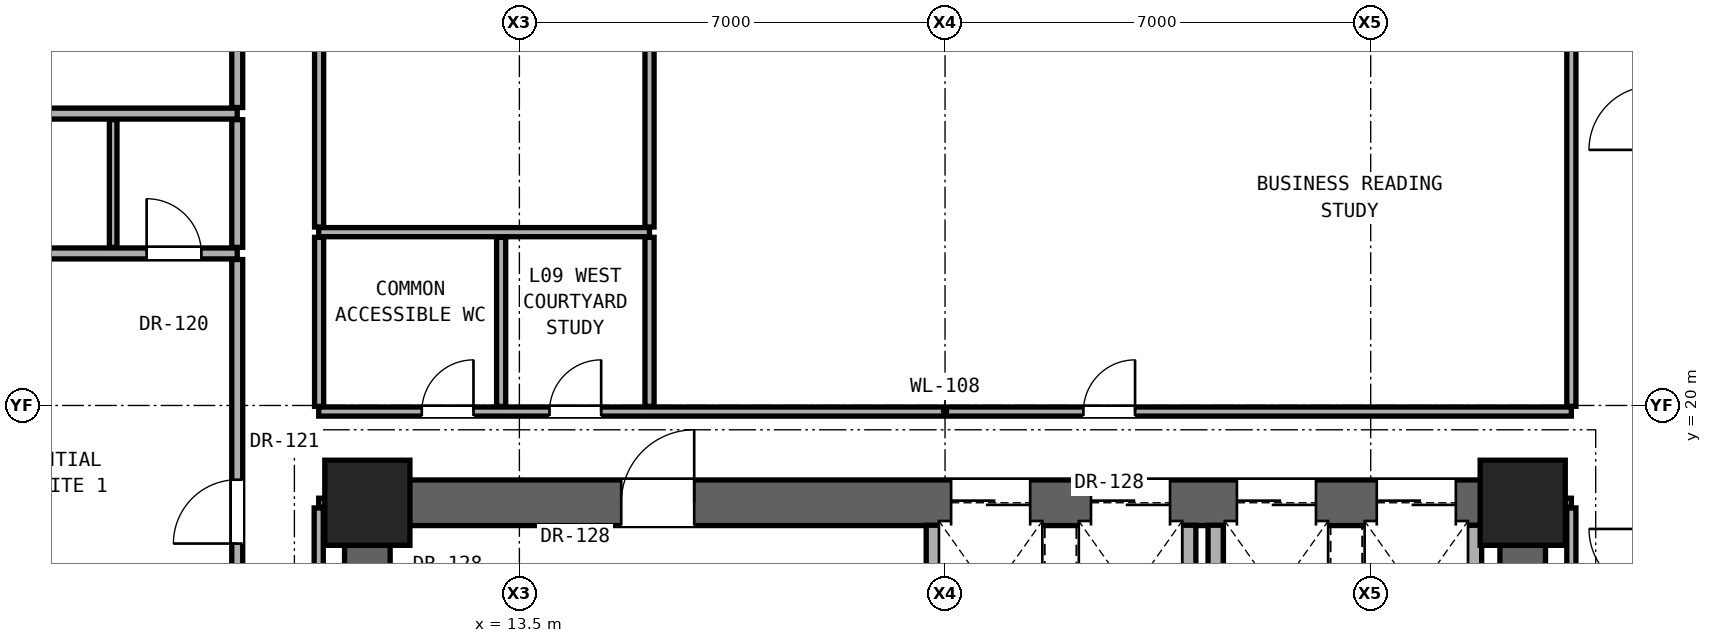
"""IFC4 building model, lengths in metres.
Left out: names, types, materials, properties, quantities, classifications, styles, units other than length and angle.
Written with IfcOpenShell. Run it as: python <this file> out.ifc"""

import sys

from ifc_helpers import new_model, si_unit, direction, frame, frame_2d, origin, origin_2d, place, context, subcontext, project, spatial, rectangle, extrude, element, fill, save


model = new_model("IFC4")
c1 = context("Model", 3, precision=1e-05, world=origin(), true_north=direction((0.0, 1.0)))
c2 = subcontext(c1, "Body", "Model", "MODEL_VIEW")
j1 = project(units=[si_unit("LENGTHUNIT", "METRE"), si_unit("PLANEANGLEUNIT", "RADIAN")], contexts=[c1])
p1 = place(None, origin())
s1 = spatial("IfcSite", under=j1, at=p1, CompositionType="ELEMENT")
p2 = place(p1, origin())
s2 = spatial("IfcBuilding", under=s1, at=p2, CompositionType="ELEMENT")
p3 = place(p2, frame((0.0, 0.0, 35.6)))
s3 = spatial("IfcBuildingStorey", under=s2, at=p3, CompositionType="ELEMENT", Elevation=35.6)
for number, where, z_axis, x_axis in (
    (1, (11.0, 18.4, 0.0), (0.0, 0.0, 1.0), (1.0, 0.0, 0.0)),
    (2, (30.0, 18.4, 0.0), (0.0, 0.0, 1.0), (1.0, 0.0, 0.0)),
):
    element("IfcColumn", number, at=place(p3, frame(where, z_axis=z_axis, x_axis=x_axis)), inside=s3, PredefinedType="COLUMN", context=c2, shape_type="SweptSolid", body=[
        extrude(rectangle(XDim=1.4, YDim=1.4, at=origin_2d()), origin(), (0.0, 0.0, 1.0), 3.3),
    ])
for number, where, z_axis, x_axis in (
    (3, (11.0, 12.4, 0.0), (0.0, 0.0, 1.0), (0.0, 1.0, 0.0)),
    (4, (30.0, 12.4, 0.0), (0.0, 0.0, 1.0), (0.0, 1.0, 0.0)),
):
    element("IfcWall", number, at=place(p3, frame(where, z_axis=z_axis, x_axis=x_axis)), inside=s3, PredefinedType="SHEAR", context=c2, shape_type="SweptSolid", body=[
        extrude(rectangle(XDim=6.0, YDim=0.75, at=frame_2d((3.0, 0.0))), origin(), (0.0, 0.0, 1.0), 3.06),
    ])
p4 = place(p3, frame((11.0, 18.4, 0.0), z_axis=(0.0, 0.0, 1.0), x_axis=(1.0, 0.0, 0.0)))
e5 = element("IfcWall", 5, at=p4, inside=s3, PredefinedType="SHEAR", context=c2, shape_type="SweptSolid", body=[
    extrude(rectangle(XDim=19.0, YDim=0.75, at=frame_2d((9.5, 0.0))), origin(), (0.0, 0.0, 1.0), 3.06),
])
p5 = place(p4, frame((4.175, 0.0, 0.0)))
e6 = element("IfcOpeningElement", 6, at=p5, cuts=e5, PredefinedType="OPENING", context=c2, shape_type="SweptSolid", body=[
    extrude(rectangle(XDim=1.2, YDim=2.25, at=frame_2d((0.6, 1.125))), frame((0.0, 0.385, 0.0), z_axis=(0.0, -1.0, 0.0), x_axis=(1.0, 0.0, 0.0)), (0.0, 0.0, 1.0), 0.77),
])
p6 = place(p4, frame((9.6, 0.0, 0.0)))
e7 = element("IfcOpeningElement", 7, at=p6, cuts=e5, PredefinedType="OPENING", context=c2, shape_type="SweptSolid", body=[
    extrude(rectangle(XDim=1.3, YDim=2.3, at=frame_2d((0.65, 1.15))), frame((0.0, 0.385, 0.0), z_axis=(0.0, -1.0, 0.0), x_axis=(1.0, 0.0, 0.0)), (0.0, 0.0, 1.0), 0.77),
])
p7 = place(p4, frame((11.9, 0.0, 0.0)))
e8 = element("IfcOpeningElement", 8, at=p7, cuts=e5, PredefinedType="OPENING", context=c2, shape_type="SweptSolid", body=[
    extrude(rectangle(XDim=1.3, YDim=2.3, at=frame_2d((0.65, 1.15))), frame((0.0, 0.385, 0.0), z_axis=(0.0, -1.0, 0.0), x_axis=(1.0, 0.0, 0.0)), (0.0, 0.0, 1.0), 0.77),
])
p8 = place(p4, frame((14.3, 0.0, 0.0)))
e9 = element("IfcOpeningElement", 9, at=p8, cuts=e5, PredefinedType="OPENING", context=c2, shape_type="SweptSolid", body=[
    extrude(rectangle(XDim=1.3, YDim=2.3, at=frame_2d((0.65, 1.15))), frame((0.0, 0.385, 0.0), z_axis=(0.0, -1.0, 0.0), x_axis=(1.0, 0.0, 0.0)), (0.0, 0.0, 1.0), 0.77),
])
p9 = place(p4, frame((16.6, 0.0, 0.0)))
e10 = element("IfcOpeningElement", 10, at=p9, cuts=e5, PredefinedType="OPENING", context=c2, shape_type="SweptSolid", body=[
    extrude(rectangle(XDim=1.3, YDim=2.3, at=frame_2d((0.65, 1.15))), frame((0.0, 0.385, 0.0), z_axis=(0.0, -1.0, 0.0), x_axis=(1.0, 0.0, 0.0)), (0.0, 0.0, 1.0), 0.77),
])
for number, where, z_axis, x_axis in (
    (11, (10.2, 18.4, 0.0), (0.0, 0.0, 1.0), (1.0, 0.0, 0.0)),
    (12, (30.37, 18.4, 0.0), (0.0, 0.0, 1.0), (1.0, 0.0, 0.0)),
):
    element("IfcWall", number, at=place(p3, frame(where, z_axis=z_axis, x_axis=x_axis)), inside=s3, PredefinedType="PARTITIONING", context=c2, shape_type="SweptSolid", body=[
        extrude(rectangle(XDim=0.43, YDim=0.15, at=frame_2d((0.215, 0.0))), origin(), (0.0, 0.0, 1.0), 2.436),
    ])
p10 = place(p3, frame((10.2, 19.9, 0.0), z_axis=(0.0, 0.0, 1.0), x_axis=(1.0, 0.0, 0.0)))
e13 = element("IfcWall", 13, at=p10, inside=s3, PredefinedType="PARTITIONING", context=c2, shape_type="SweptSolid", body=[
    extrude(rectangle(XDim=20.6, YDim=0.15, at=frame_2d((10.3, 0.0))), origin(), (0.0, 0.0, 1.0), 2.104),
])
p11 = place(p10, frame((1.695, 0.0, 0.0)))
e14 = element("IfcOpeningElement", 14, at=p11, cuts=e13, PredefinedType="OPENING", context=c2, shape_type="SweptSolid", body=[
    extrude(rectangle(XDim=0.85, YDim=2.01, at=frame_2d((0.425, 1.005))), frame((0.0, 0.085, 0.0), z_axis=(0.0, -1.0, 0.0), x_axis=(1.0, 0.0, 0.0)), (0.0, 0.0, 1.0), 0.17),
])
p12 = place(p10, frame((3.795, 0.0, 0.0)))
e15 = element("IfcOpeningElement", 15, at=p12, cuts=e13, PredefinedType="OPENING", context=c2, shape_type="SweptSolid", body=[
    extrude(rectangle(XDim=0.85, YDim=2.01, at=frame_2d((0.425, 1.005))), frame((0.0, 0.085, 0.0), z_axis=(0.0, -1.0, 0.0), x_axis=(1.0, 0.0, 0.0)), (0.0, 0.0, 1.0), 0.17),
])
p13 = place(p10, frame((12.575, 0.0, 0.0)))
e16 = element("IfcOpeningElement", 16, at=p13, cuts=e13, PredefinedType="OPENING", context=c2, shape_type="SweptSolid", body=[
    extrude(rectangle(XDim=0.85, YDim=2.01, at=frame_2d((0.425, 1.005))), frame((0.0, 0.085, 0.0), z_axis=(0.0, -1.0, 0.0), x_axis=(1.0, 0.0, 0.0)), (0.0, 0.0, 1.0), 0.17),
])
p14 = place(p3, frame((-1.6, 22.5, 0.0), z_axis=(0.0, 0.0, 1.0), x_axis=(1.0, 0.0, 0.0)))
e17 = element("IfcWall", 17, at=p14, inside=s3, PredefinedType="PARTITIONING", context=c2, shape_type="SweptSolid", body=[
    extrude(rectangle(XDim=10.46, YDim=0.18, at=frame_2d((5.23, 0.0))), origin(), (0.0, 0.0, 1.0), 2.125),
])
p15 = place(p14, frame((3.805, 0.0, 0.0)))
e18 = element("IfcOpeningElement", 18, at=p15, cuts=e17, PredefinedType="OPENING", context=c2, shape_type="SweptSolid", body=[
    extrude(rectangle(XDim=0.85, YDim=2.01, at=frame_2d((0.425, 1.005))), frame((0.0, 0.1, 0.0), z_axis=(0.0, -1.0, 0.0), x_axis=(1.0, 0.0, 0.0)), (0.0, 0.0, 1.0), 0.2),
])
p16 = place(p14, frame((8.97, 0.0, 0.0)))
e19 = element("IfcOpeningElement", 19, at=p16, cuts=e17, PredefinedType="OPENING", context=c2, shape_type="SweptSolid", body=[
    extrude(rectangle(XDim=0.9, YDim=2.1, at=frame_2d((0.45, 1.05))), frame((0.0, 0.1, 0.0), z_axis=(0.0, -1.0, 0.0), x_axis=(1.0, 0.0, 0.0)), (0.0, 0.0, 1.0), 0.2),
])
p17 = place(p3, frame((10.2, 22.85, 0.0), z_axis=(0.0, 0.0, 1.0), x_axis=(1.0, 0.0, 0.0)))
e20 = element("IfcWall", 20, at=p17, inside=s3, PredefinedType="PARTITIONING", context=c2, shape_type="SweptSolid", body=[
    extrude(rectangle(XDim=5.44, YDim=0.15, at=frame_2d((2.72, 0.0))), origin(), (0.0, 0.0, 1.0), 2.104),
])
p18 = place(p3, frame((-1.6, 24.8, 0.0), z_axis=(0.0, 0.0, 1.0), x_axis=(1.0, 0.0, 0.0)))
e21 = element("IfcWall", 21, at=p18, inside=s3, PredefinedType="PARTITIONING", context=c2, shape_type="SweptSolid", body=[
    extrude(rectangle(XDim=10.46, YDim=0.18, at=frame_2d((5.23, 0.0))), origin(), (0.0, 0.0, 1.0), 2.125),
])
p19 = place(p3, frame((6.82, 22.6, 0.0), z_axis=(0.0, 0.0, 1.0), x_axis=(0.0, 1.0, 0.0)))
e22 = element("IfcWall", 22, at=p19, inside=s3, PredefinedType="PARTITIONING", context=c2, shape_type="SweptSolid", body=[
    extrude(rectangle(XDim=2.1, YDim=0.125, at=frame_2d((1.05, 0.0))), origin(), (0.0, 0.0, 1.0), 2.279),
])
p20 = place(p3, frame((8.86, 14.108, 0.0), z_axis=(0.0, 0.0, 1.0), x_axis=(0.0, 1.0, 0.0)))
e23 = element("IfcWall", 23, at=p20, inside=s3, PredefinedType="PARTITIONING", context=c2, shape_type="SweptSolid", body=[
    extrude(rectangle(XDim=8.292, YDim=0.18, at=frame_2d((4.146, 0.0))), origin(), (0.0, 0.0, 1.0), 2.436),
])
p21 = place(p20, frame((3.621, 0.0, 0.0)))
e24 = element("IfcOpeningElement", 24, at=p21, cuts=e23, PredefinedType="OPENING", context=c2, shape_type="SweptSolid", body=[
    extrude(rectangle(XDim=1.05, YDim=2.2, at=frame_2d((0.525, 1.1))), frame((0.0, 0.1, 0.0), z_axis=(0.0, -1.0, 0.0), x_axis=(1.0, 0.0, 0.0)), (0.0, 0.0, 1.0), 0.2),
])
p22 = place(p3, frame((8.86, 22.6, 0.0), z_axis=(0.0, 0.0, 1.0), x_axis=(0.0, 1.0, 0.0)))
e25 = element("IfcWall", 25, at=p22, inside=s3, PredefinedType="PARTITIONING", context=c2, shape_type="SweptSolid", body=[
    extrude(rectangle(XDim=2.1, YDim=0.18, at=frame_2d((1.05, 0.0))), origin(), (0.0, 0.0, 1.0), 2.279),
])
p23 = place(p3, frame((8.86, 24.9, 0.0), z_axis=(0.0, 0.0, 1.0), x_axis=(0.0, 1.0, 0.0)))
e26 = element("IfcWall", 26, at=p23, inside=s3, PredefinedType="PARTITIONING", context=c2, shape_type="SweptSolid", body=[
    extrude(rectangle(XDim=3.9, YDim=0.18, at=frame_2d((1.95, 0.0))), origin(), (0.0, 0.0, 1.0), 2.279),
])
p24 = place(p23, frame((1.425, 0.0, 0.0)))
e27 = element("IfcOpeningElement", 27, at=p24, cuts=e26, PredefinedType="OPENING", context=c2, shape_type="SweptSolid", body=[
    extrude(rectangle(XDim=1.05, YDim=2.2, at=frame_2d((0.525, 1.1))), frame((0.0, 0.1, 0.0), z_axis=(0.0, -1.0, 0.0), x_axis=(1.0, 0.0, 0.0)), (0.0, 0.0, 1.0), 0.2),
])
p25 = place(p3, frame((10.2, 12.335, 0.0), z_axis=(0.0, 0.0, 1.0), x_axis=(0.0, 1.0, 0.0)))
e28 = element("IfcWall", 28, at=p25, inside=s3, PredefinedType="PARTITIONING", context=c2, shape_type="SweptSolid", body=[
    extrude(rectangle(XDim=5.98, YDim=0.15, at=frame_2d((2.99, 0.0))), origin(), (0.0, 0.0, 1.0), 2.436),
])
p26 = place(p3, frame((10.207, 19.985, 0.0), z_axis=(0.0, 0.0, 1.0), x_axis=(0.0, 1.0, 0.0)))
e29 = element("IfcWall", 29, at=p26, inside=s3, PredefinedType="PARTITIONING", context=c2, shape_type="SweptSolid", body=[
    extrude(rectangle(XDim=2.78, YDim=0.15, at=frame_2d((1.39, 0.0))), origin(), (0.0, 0.0, 1.0), 3.06),
])
p27 = place(p3, frame((10.207, 22.935, 0.0), z_axis=(0.0, 0.0, 1.0), x_axis=(0.0, 1.0, 0.0)))
e30 = element("IfcWall", 30, at=p27, inside=s3, PredefinedType="PARTITIONING", context=c2, shape_type="SweptSolid", body=[
    extrude(rectangle(XDim=10.08, YDim=0.15, at=frame_2d((5.04, 0.0))), origin(), (0.0, 0.0, 1.0), 2.279),
])
p28 = place(p27, frame((4.565, 0.0, 0.0)))
e31 = element("IfcOpeningElement", 31, at=p28, cuts=e30, PredefinedType="OPENING", context=c2, shape_type="SweptSolid", body=[
    extrude(rectangle(XDim=0.95, YDim=2.15, at=frame_2d((0.475, 1.075))), frame((0.0, 0.085, 0.0), z_axis=(0.0, -1.0, 0.0), x_axis=(1.0, 0.0, 0.0)), (0.0, 0.0, 1.0), 0.17),
])
p29 = place(p3, frame((13.2, 19.985, 0.0), z_axis=(0.0, 0.0, 1.0), x_axis=(0.0, 1.0, 0.0)))
e32 = element("IfcWall", 32, at=p29, inside=s3, PredefinedType="PARTITIONING", context=c2, shape_type="SweptSolid", body=[
    extrude(rectangle(XDim=2.78, YDim=0.15, at=frame_2d((1.39, 0.0))), origin(), (0.0, 0.0, 1.0), 3.06),
])
p30 = place(p3, frame((15.64, 19.985, 0.0), z_axis=(0.0, 0.0, 1.0), x_axis=(0.0, 1.0, 0.0)))
e33 = element("IfcWall", 33, at=p30, inside=s3, PredefinedType="PARTITIONING", context=c2, shape_type="SweptSolid", body=[
    extrude(rectangle(XDim=2.78, YDim=0.15, at=frame_2d((1.39, 0.0))), origin(), (0.0, 0.0, 1.0), 2.589),
])
p31 = place(p3, frame((15.64, 22.935, 0.0), z_axis=(0.0, 0.0, 1.0), x_axis=(0.0, 1.0, 0.0)))
e34 = element("IfcWall", 34, at=p31, inside=s3, PredefinedType="PARTITIONING", context=c2, shape_type="SweptSolid", body=[
    extrude(rectangle(XDim=4.008, YDim=0.15, at=frame_2d((2.004, 0.0))), origin(), (0.0, 0.0, 1.0), 2.104),
])
p32 = place(p3, frame((20.315, 16.555, 0.0), z_axis=(0.0, 0.0, 1.0), x_axis=(0.0, 1.0, 0.0)))
e35 = element("IfcWall", 35, at=p32, inside=s3, PredefinedType="SOLIDWALL", context=c2, shape_type="SweptSolid", body=[
    extrude(rectangle(XDim=1.475, YDim=0.25, at=frame_2d((0.738, 0.0))), origin(), (0.0, 0.0, 1.0), 3.06),
])
for number, where, z_axis, x_axis in (
    (36, (24.5, 15.785, 0.0), (0.0, 0.0, 1.0), (0.0, 1.0, 0.0)),
    (37, (24.95, 15.785, 0.0), (0.0, 0.0, 1.0), (0.0, 1.0, 0.0)),
    (38, (29.2, 15.785, 0.0), (0.0, 0.0, 1.0), (0.0, 1.0, 0.0)),
):
    element("IfcWall", number, at=place(p3, frame(where, z_axis=z_axis, x_axis=x_axis)), inside=s3, PredefinedType="SOLIDWALL", context=c2, shape_type="SweptSolid", body=[
        extrude(rectangle(XDim=2.245, YDim=0.25, at=frame_2d((1.123, 0.0))), origin(), (0.0, 0.0, 1.0), 3.06),
    ])
p33 = place(p3, frame((30.8, 12.335, 0.0), z_axis=(0.0, 0.0, 1.0), x_axis=(0.0, 1.0, 0.0)))
e39 = element("IfcWall", 39, at=p33, inside=s3, PredefinedType="PARTITIONING", context=c2, shape_type="SweptSolid", body=[
    extrude(rectangle(XDim=5.98, YDim=0.15, at=frame_2d((2.99, 0.0))), origin(), (0.0, 0.0, 1.0), 2.436),
])
p34 = place(p3, frame((30.8, 19.985, 0.0), z_axis=(0.0, 0.0, 1.0), x_axis=(0.0, 1.0, 0.0)))
e40 = element("IfcWall", 40, at=p34, inside=s3, PredefinedType="PARTITIONING", context=c2, shape_type="SweptSolid", body=[
    extrude(rectangle(XDim=6.958, YDim=0.15, at=frame_2d((3.479, 0.0))), origin(), (0.0, 0.0, 1.0), 2.279),
])
p35 = place(p5, origin())
e41 = element("IfcDoor", 41, at=p35, inside=s3, OperationType="SINGLE_SWING_RIGHT", PredefinedType="DOOR", context=c2, shape_type="SweptSolid", body=[
    extrude(rectangle(XDim=1.2, YDim=2.25, at=frame_2d((0.6, 1.125))), frame((0.0, 0.025, 0.0), z_axis=(0.0, -1.0, 0.0), x_axis=(1.0, 0.0, 0.0)), (0.0, 0.0, 1.0), 0.05),
])
fill(e6, e41)
p36 = place(p11, origin())
e42 = element("IfcDoor", 42, at=p36, inside=s3, OperationType="SINGLE_SWING_RIGHT", PredefinedType="DOOR", context=c2, shape_type="SweptSolid", body=[
    extrude(rectangle(XDim=0.85, YDim=2.01, at=frame_2d((0.425, 1.005))), frame((0.0, 0.025, 0.0), z_axis=(0.0, -1.0, 0.0), x_axis=(1.0, 0.0, 0.0)), (0.0, 0.0, 1.0), 0.05),
])
fill(e14, e42)
p37 = place(p21, origin())
e43 = element("IfcDoor", 43, at=p37, inside=s3, OperationType="SINGLE_SWING_LEFT", PredefinedType="DOOR", context=c2, shape_type="SweptSolid", body=[
    extrude(rectangle(XDim=1.05, YDim=2.2, at=frame_2d((0.525, 1.1))), frame((0.0, 0.025, 0.0), z_axis=(0.0, -1.0, 0.0), x_axis=(1.0, 0.0, 0.0)), (0.0, 0.0, 1.0), 0.05),
])
fill(e24, e43)
p38 = place(p16, origin())
e44 = element("IfcDoor", 44, at=p38, inside=s3, OperationType="SINGLE_SWING_LEFT", PredefinedType="DOOR", context=c2, shape_type="SweptSolid", body=[
    extrude(rectangle(XDim=0.9, YDim=2.1, at=frame_2d((0.45, 1.05))), frame((0.0, 0.025, 0.0), z_axis=(0.0, -1.0, 0.0), x_axis=(1.0, 0.0, 0.0)), (0.0, 0.0, 1.0), 0.05),
])
fill(e19, e44)
p39 = place(p12, origin())
e45 = element("IfcDoor", 45, at=p39, inside=s3, OperationType="SINGLE_SWING_RIGHT", PredefinedType="DOOR", context=c2, shape_type="SweptSolid", body=[
    extrude(rectangle(XDim=0.85, YDim=2.01, at=frame_2d((0.425, 1.005))), frame((0.0, 0.025, 0.0), z_axis=(0.0, -1.0, 0.0), x_axis=(1.0, 0.0, 0.0)), (0.0, 0.0, 1.0), 0.05),
])
fill(e15, e45)
p40 = place(p13, origin())
e46 = element("IfcDoor", 46, at=p40, inside=s3, OperationType="SINGLE_SWING_RIGHT", PredefinedType="DOOR", context=c2, shape_type="SweptSolid", body=[
    extrude(rectangle(XDim=0.85, YDim=2.01, at=frame_2d((0.425, 1.005))), frame((0.0, 0.025, 0.0), z_axis=(0.0, -1.0, 0.0), x_axis=(1.0, 0.0, 0.0)), (0.0, 0.0, 1.0), 0.05),
])
fill(e16, e46)
p41 = place(p6, origin())
e47 = element("IfcDoor", 47, at=p41, inside=s3, OperationType="DOUBLE_DOOR_SLIDING", PredefinedType="DOOR", context=c2, shape_type="SweptSolid", body=[
    extrude(rectangle(XDim=1.3, YDim=2.3, at=frame_2d((0.65, 1.15))), frame((0.0, 0.025, 0.0), z_axis=(0.0, -1.0, 0.0), x_axis=(1.0, 0.0, 0.0)), (0.0, 0.0, 1.0), 0.05),
])
fill(e7, e47)
p42 = place(p7, origin())
e48 = element("IfcDoor", 48, at=p42, inside=s3, OperationType="DOUBLE_DOOR_SLIDING", PredefinedType="DOOR", context=c2, shape_type="SweptSolid", body=[
    extrude(rectangle(XDim=1.3, YDim=2.3, at=frame_2d((0.65, 1.15))), frame((0.0, 0.025, 0.0), z_axis=(0.0, -1.0, 0.0), x_axis=(1.0, 0.0, 0.0)), (0.0, 0.0, 1.0), 0.05),
])
fill(e8, e48)
p43 = place(p8, origin())
e49 = element("IfcDoor", 49, at=p43, inside=s3, OperationType="DOUBLE_DOOR_SLIDING", PredefinedType="DOOR", context=c2, shape_type="SweptSolid", body=[
    extrude(rectangle(XDim=1.3, YDim=2.3, at=frame_2d((0.65, 1.15))), frame((0.0, 0.025, 0.0), z_axis=(0.0, -1.0, 0.0), x_axis=(1.0, 0.0, 0.0)), (0.0, 0.0, 1.0), 0.05),
])
fill(e9, e49)
p44 = place(p9, origin())
e50 = element("IfcDoor", 50, at=p44, inside=s3, OperationType="DOUBLE_DOOR_SLIDING", PredefinedType="DOOR", context=c2, shape_type="SweptSolid", body=[
    extrude(rectangle(XDim=1.3, YDim=2.3, at=frame_2d((0.65, 1.15))), frame((0.0, 0.025, 0.0), z_axis=(0.0, -1.0, 0.0), x_axis=(1.0, 0.0, 0.0)), (0.0, 0.0, 1.0), 0.05),
])
fill(e10, e50)
save(model, sys.argv[1])
